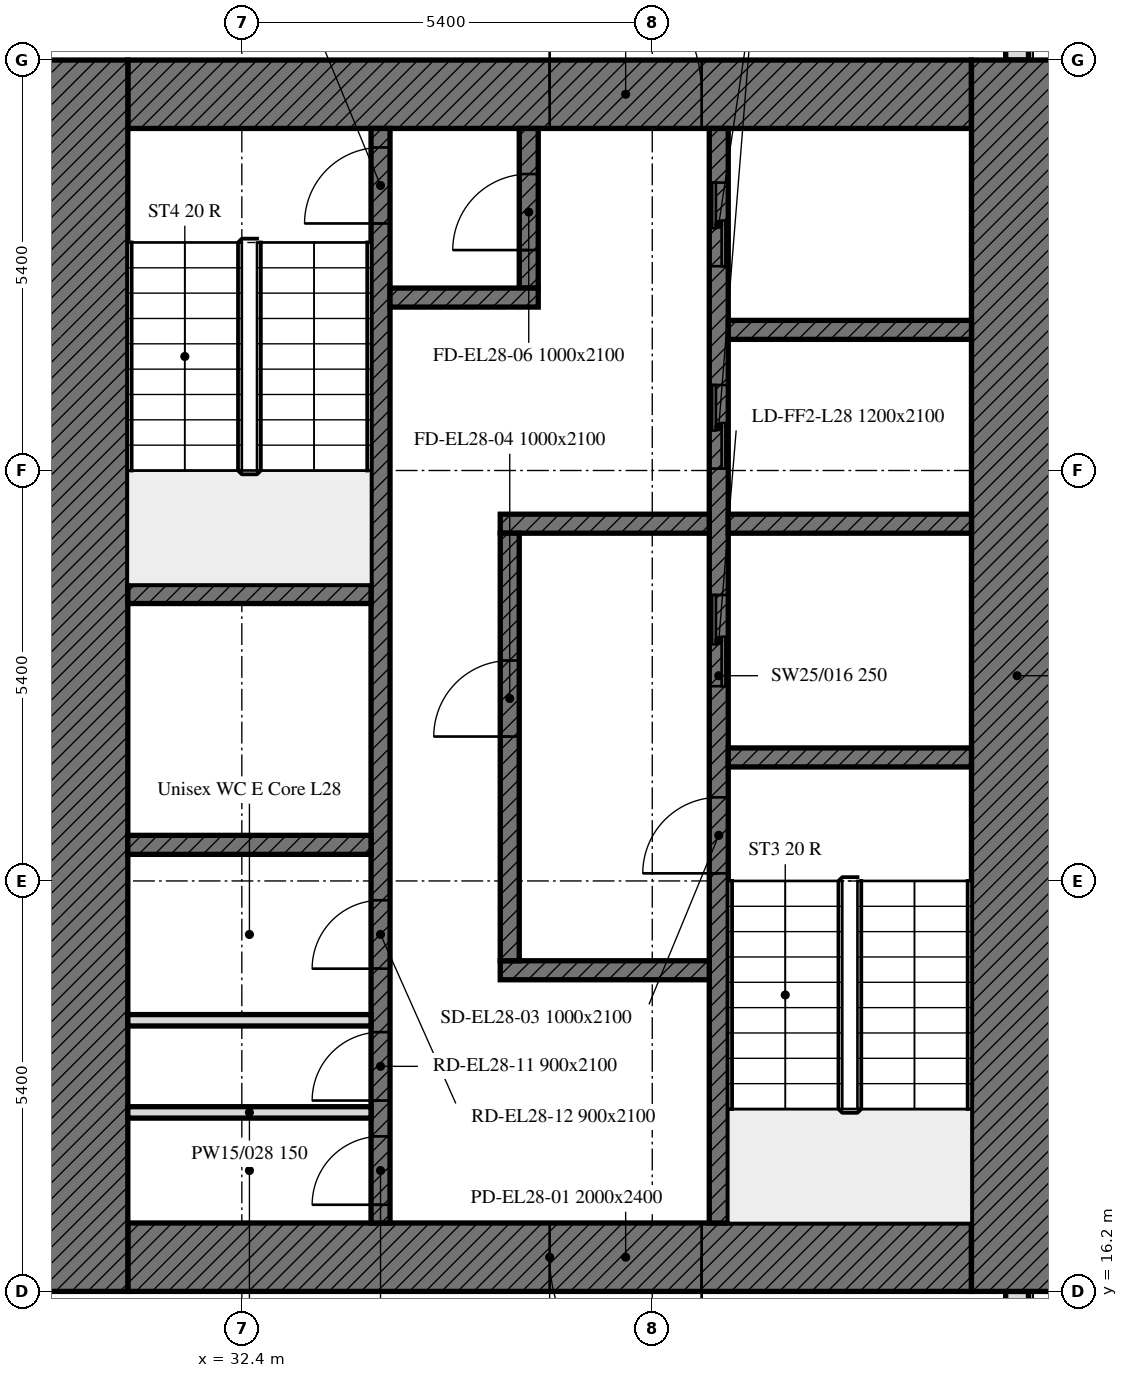
"""IFC4 building model, lengths in metres.
Left out: names, types, materials, properties, quantities, classifications, styles, units other than length and angle.
Written with IfcOpenShell. Run it as: python <this file> out.ifc"""

import sys

from ifc_helpers import new_model, si_unit, direction, frame, frame_2d, origin, place, context, subcontext, project, spatial, rectangle, extrude, element, fill, save


model = new_model("IFC4")
c1 = context("Model", 3, precision=1e-05, world=origin(), true_north=direction((0.0, 1.0)))
c2 = subcontext(c1, "Body", "Model", "MODEL_VIEW")
j1 = project(units=[si_unit("LENGTHUNIT", "METRE"), si_unit("PLANEANGLEUNIT", "RADIAN")], contexts=[c1])
p1 = place(None, origin())
s1 = spatial("IfcSite", under=j1, at=p1, CompositionType="ELEMENT")
p2 = place(p1, origin())
s2 = spatial("IfcBuilding", under=s1, at=p2, CompositionType="ELEMENT")
p3 = place(p2, frame((0.0, 0.0, 118.2)))
s3 = spatial("IfcBuildingStorey", under=s2, at=p3, CompositionType="ELEMENT", Elevation=118.2)
p4 = place(p3, frame((42.6, 10.986, 0.0), z_axis=(0.0, 0.0, 1.0), x_axis=(0.0, 1.0, 0.0)))
e1 = element("IfcWall", 1, at=p4, inside=s3, PredefinedType="SOLIDWALL", context=c2, shape_type="SweptSolid", body=[
    extrude(rectangle(XDim=5.214, YDim=0.3, at=frame_2d((2.607, 0.0))), origin(), (0.0, 0.0, 1.0), 3.5),
])
p5 = place(p4, frame((1.164, 0.0, 0.9)))
e2 = element("IfcOpeningElement", 2, at=p5, cuts=e1, PredefinedType="OPENING", context=c2, shape_type="SweptSolid", body=[
    extrude(rectangle(XDim=1.1, YDim=1.7, at=frame_2d((0.55, 0.85))), frame((0.0, 0.16, 0.0), z_axis=(0.0, -1.0, 0.0), x_axis=(1.0, 0.0, 0.0)), (0.0, 0.0, 1.0), 0.32),
])
p6 = place(p4, frame((2.764, 0.0, 0.9)))
e3 = element("IfcOpeningElement", 3, at=p6, cuts=e1, PredefinedType="OPENING", context=c2, shape_type="SweptSolid", body=[
    extrude(rectangle(XDim=1.1, YDim=1.7, at=frame_2d((0.55, 0.85))), frame((0.0, 0.16, 0.0), z_axis=(0.0, -1.0, 0.0), x_axis=(1.0, 0.0, 0.0)), (0.0, 0.0, 1.0), 0.32),
])
p7 = place(p3, frame((42.6, 32.4, 0.0), z_axis=(0.0, 0.0, 1.0), x_axis=(0.0, 1.0, 0.0)))
e4 = element("IfcWall", 4, at=p7, inside=s3, PredefinedType="SOLIDWALL", context=c2, shape_type="SweptSolid", body=[
    extrude(rectangle(XDim=10.614, YDim=0.3, at=frame_2d((5.307, 0.0))), origin(), (0.0, 0.0, 1.0), 3.5),
])
p8 = place(p7, frame((1.35, 0.0, 0.9)))
e5 = element("IfcOpeningElement", 5, at=p8, cuts=e4, PredefinedType="OPENING", context=c2, shape_type="SweptSolid", body=[
    extrude(rectangle(XDim=1.1, YDim=1.7, at=frame_2d((0.55, 0.85))), frame((0.0, 0.16, 0.0), z_axis=(0.0, -1.0, 0.0), x_axis=(1.0, 0.0, 0.0)), (0.0, 0.0, 1.0), 0.32),
])
p9 = place(p7, frame((2.95, 0.0, 0.9)))
e6 = element("IfcOpeningElement", 6, at=p9, cuts=e4, PredefinedType="OPENING", context=c2, shape_type="SweptSolid", body=[
    extrude(rectangle(XDim=1.1, YDim=1.7, at=frame_2d((0.55, 0.85))), frame((0.0, 0.16, 0.0), z_axis=(0.0, -1.0, 0.0), x_axis=(1.0, 0.0, 0.0)), (0.0, 0.0, 1.0), 0.32),
])
p10 = place(p3, frame((42.0, 16.65, 0.0), z_axis=(0.0, 0.0, 1.0), x_axis=(-1.0, 0.0, 0.0)))
e7 = element("IfcWall", 7, at=p10, inside=s3, PredefinedType="SOLIDWALL", context=c2, shape_type="SweptSolid", body=[
    extrude(rectangle(XDim=11.1, YDim=0.9, at=frame_2d((5.55, 0.0))), origin(), (0.0, 0.0, 1.0), 3.5),
])
p11 = place(p10, frame((3.55, 0.0, 0.0)))
e8 = element("IfcOpeningElement", 8, at=p11, cuts=e7, PredefinedType="OPENING", context=c2, shape_type="SweptSolid", body=[
    extrude(rectangle(XDim=2.0, YDim=2.4, at=frame_2d((1.0, 1.2))), frame((0.0, 0.45, 0.0), z_axis=(0.0, -1.0, 0.0), x_axis=(1.0, 0.0, 0.0)), (0.0, 0.0, 1.0), 0.9),
])
p12 = place(p3, frame((30.9, 31.95, 0.0), z_axis=(0.0, 0.0, 1.0), x_axis=(1.0, 0.0, 0.0)))
e9 = element("IfcWall", 9, at=p12, inside=s3, PredefinedType="SOLIDWALL", context=c2, shape_type="SweptSolid", body=[
    extrude(rectangle(XDim=11.1, YDim=0.9, at=frame_2d((5.55, 0.0))), origin(), (0.0, 0.0, 1.0), 3.5),
])
p13 = place(p12, frame((5.55, 0.0, 0.0)))
e10 = element("IfcOpeningElement", 10, at=p13, cuts=e9, PredefinedType="OPENING", context=c2, shape_type="SweptSolid", body=[
    extrude(rectangle(XDim=2.0, YDim=2.4, at=frame_2d((1.0, 1.2))), frame((0.0, 0.45, 0.0), z_axis=(0.0, -1.0, 0.0), x_axis=(1.0, 0.0, 0.0)), (0.0, 0.0, 1.0), 0.9),
])
for number, where, z_axis, x_axis in (
    (11, (42.6, 32.4, 0.0), (0.0, 0.0, 1.0), (0.0, -1.0, 0.0)),
    (12, (30.3, 16.2, 0.0), (0.0, 0.0, 1.0), (0.0, 1.0, 0.0)),
):
    element("IfcWall", number, at=place(p3, frame(where, z_axis=z_axis, x_axis=x_axis)), inside=s3, PredefinedType="SOLIDWALL", context=c2, shape_type="SweptSolid", body=[
        extrude(rectangle(XDim=16.2, YDim=1.2, at=frame_2d((8.1, 0.0))), origin(), (0.0, 0.0, 1.0), 3.5),
    ])
p14 = place(p3, frame((38.675, 17.1, 0.0), z_axis=(0.0, 0.0, 1.0), x_axis=(0.0, 1.0, 0.0)))
e13 = element("IfcWall", 13, at=p14, inside=s3, PredefinedType="SOLIDWALL", context=c2, shape_type="SweptSolid", body=[
    extrude(rectangle(XDim=14.4, YDim=0.25, at=frame_2d((7.2, 0.0))), origin(), (0.0, 0.0, 1.0), 3.5),
])
p15 = place(p14, frame((4.6, 0.0, 0.0)))
e14 = element("IfcOpeningElement", 14, at=p15, cuts=e13, PredefinedType="OPENING", context=c2, shape_type="SweptSolid", body=[
    extrude(rectangle(XDim=1.0, YDim=2.1, at=frame_2d((0.5, 1.05))), frame((0.0, 0.125, 0.0), z_axis=(0.0, -1.0, 0.0), x_axis=(1.0, 0.0, 0.0)), (0.0, 0.0, 1.0), 0.25),
])
p16 = place(p14, frame((7.062, 0.0, 0.0)))
e15 = element("IfcOpeningElement", 15, at=p16, cuts=e13, PredefinedType="OPENING", context=c2, shape_type="SweptSolid", body=[
    extrude(rectangle(XDim=1.2, YDim=2.1, at=frame_2d((0.6, 1.05))), frame((0.0, 0.125, 0.0), z_axis=(0.0, -1.0, 0.0), x_axis=(1.0, 0.0, 0.0)), (0.0, 0.0, 1.0), 0.25),
])
p17 = place(p14, frame((9.925, 0.0, 0.0)))
e16 = element("IfcOpeningElement", 16, at=p17, cuts=e13, PredefinedType="OPENING", context=c2, shape_type="SweptSolid", body=[
    extrude(rectangle(XDim=1.1, YDim=2.1, at=frame_2d((0.55, 1.05))), frame((0.0, 0.125, 0.0), z_axis=(0.0, -1.0, 0.0), x_axis=(1.0, 0.0, 0.0)), (0.0, 0.0, 1.0), 0.25),
])
p18 = place(p14, frame((12.587, 0.0, 0.0)))
e17 = element("IfcOpeningElement", 17, at=p18, cuts=e13, PredefinedType="OPENING", context=c2, shape_type="SweptSolid", body=[
    extrude(rectangle(XDim=1.1, YDim=2.1, at=frame_2d((0.55, 1.05))), frame((0.0, 0.125, 0.0), z_axis=(0.0, -1.0, 0.0), x_axis=(1.0, 0.0, 0.0)), (0.0, 0.0, 1.0), 0.25),
])
p19 = place(p3, frame((34.225, 17.1, 0.0), z_axis=(0.0, 0.0, 1.0), x_axis=(0.0, 1.0, 0.0)))
e18 = element("IfcWall", 18, at=p19, inside=s3, PredefinedType="SOLIDWALL", context=c2, shape_type="SweptSolid", body=[
    extrude(rectangle(XDim=14.4, YDim=0.25, at=frame_2d((7.2, 0.0))), origin(), (0.0, 0.0, 1.0), 3.5),
])
p20 = place(p19, frame((13.15, 0.0, 0.0)))
e19 = element("IfcOpeningElement", 19, at=p20, cuts=e18, PredefinedType="OPENING", context=c2, shape_type="SweptSolid", body=[
    extrude(rectangle(XDim=1.0, YDim=2.1, at=frame_2d((0.5, 1.05))), frame((0.0, 0.125, 0.0), z_axis=(0.0, -1.0, 0.0), x_axis=(1.0, 0.0, 0.0)), (0.0, 0.0, 1.0), 0.25),
])
p21 = place(p19, frame((0.24, 0.0, 0.0)))
e20 = element("IfcOpeningElement", 20, at=p21, cuts=e18, PredefinedType="OPENING", context=c2, shape_type="SweptSolid", body=[
    extrude(rectangle(XDim=0.9, YDim=2.1, at=frame_2d((0.45, 1.05))), frame((0.0, 0.125, 0.0), z_axis=(0.0, -1.0, 0.0), x_axis=(1.0, 0.0, 0.0)), (0.0, 0.0, 1.0), 0.25),
])
p22 = place(p19, frame((1.611, 0.0, 0.0)))
e21 = element("IfcOpeningElement", 21, at=p22, cuts=e18, PredefinedType="OPENING", context=c2, shape_type="SweptSolid", body=[
    extrude(rectangle(XDim=0.9, YDim=2.1, at=frame_2d((0.45, 1.05))), frame((0.0, 0.125, 0.0), z_axis=(0.0, -1.0, 0.0), x_axis=(1.0, 0.0, 0.0)), (0.0, 0.0, 1.0), 0.25),
])
p23 = place(p19, frame((3.346, 0.0, 0.0)))
e22 = element("IfcOpeningElement", 22, at=p23, cuts=e18, PredefinedType="OPENING", context=c2, shape_type="SweptSolid", body=[
    extrude(rectangle(XDim=0.9, YDim=2.1, at=frame_2d((0.45, 1.05))), frame((0.0, 0.125, 0.0), z_axis=(0.0, -1.0, 0.0), x_axis=(1.0, 0.0, 0.0)), (0.0, 0.0, 1.0), 0.25),
])
p24 = place(p3, frame((38.8, 23.225, 0.0), z_axis=(0.0, 0.0, 1.0), x_axis=(1.0, 0.0, 0.0)))
e23 = element("IfcWall", 23, at=p24, inside=s3, PredefinedType="SOLIDWALL", context=c2, shape_type="SweptSolid", body=[
    extrude(rectangle(XDim=3.2, YDim=0.25, at=frame_2d((1.6, 0.0))), origin(), (0.0, 0.0, 1.0), 3.5),
])
for number, where, z_axis, x_axis in (
    (24, (30.9, 25.375, 0.0), (0.0, 0.0, 1.0), (1.0, 0.0, 0.0)),
    (25, (30.9, 22.075, 0.0), (0.0, 0.0, 1.0), (1.0, 0.0, 0.0)),
):
    element("IfcWall", number, at=place(p3, frame(where, z_axis=z_axis, x_axis=x_axis)), inside=s3, PredefinedType="SOLIDWALL", context=c2, shape_type="SweptSolid", body=[
        extrude(rectangle(XDim=3.2, YDim=0.25, at=frame_2d((1.6, 0.0))), origin(), (0.0, 0.0, 1.0), 3.5),
    ])
p25 = place(p3, frame((38.8, 26.3, 0.0), z_axis=(0.0, 0.0, 1.0), x_axis=(1.0, 0.0, 0.0)))
e26 = element("IfcWall", 26, at=p25, inside=s3, PredefinedType="SOLIDWALL", context=c2, shape_type="SweptSolid", body=[
    extrude(rectangle(XDim=3.2, YDim=0.25, at=frame_2d((1.6, 0.0))), origin(), (0.0, 0.0, 1.0), 3.5),
])
for number, where, z_axis, x_axis in (
    (27, (35.8, 26.3, 0.0), (0.0, 0.0, 1.0), (1.0, 0.0, 0.0)),
    (28, (35.8, 20.425, 0.0), (0.0, 0.0, 1.0), (1.0, 0.0, 0.0)),
):
    element("IfcWall", number, at=place(p3, frame(where, z_axis=z_axis, x_axis=x_axis)), inside=s3, PredefinedType="SOLIDWALL", context=c2, shape_type="SweptSolid", body=[
        extrude(rectangle(XDim=2.75, YDim=0.25, at=frame_2d((1.375, 0.0))), origin(), (0.0, 0.0, 1.0), 3.5),
    ])
p26 = place(p3, frame((36.175, 29.4, 0.0), z_axis=(0.0, 0.0, 1.0), x_axis=(0.0, 1.0, 0.0)))
e29 = element("IfcWall", 29, at=p26, inside=s3, PredefinedType="SOLIDWALL", context=c2, shape_type="SweptSolid", body=[
    extrude(rectangle(XDim=2.1, YDim=0.25, at=frame_2d((1.05, 0.0))), origin(), (0.0, 0.0, 1.0), 3.5),
])
p27 = place(p26, frame((0.5, 0.0, 0.0)))
e30 = element("IfcOpeningElement", 30, at=p27, cuts=e29, PredefinedType="OPENING", context=c2, shape_type="SweptSolid", body=[
    extrude(rectangle(XDim=1.0, YDim=2.1, at=frame_2d((0.5, 1.05))), frame((0.0, 0.125, 0.0), z_axis=(0.0, -1.0, 0.0), x_axis=(1.0, 0.0, 0.0)), (0.0, 0.0, 1.0), 0.25),
])
p28 = place(p3, frame((34.35, 29.275, 0.0), z_axis=(0.0, 0.0, 1.0), x_axis=(1.0, 0.0, 0.0)))
e31 = element("IfcWall", 31, at=p28, inside=s3, PredefinedType="SOLIDWALL", context=c2, shape_type="SweptSolid", body=[
    extrude(rectangle(XDim=1.95, YDim=0.25, at=frame_2d((0.975, 0.0))), origin(), (0.0, 0.0, 1.0), 3.5),
])
p29 = place(p3, frame((35.925, 20.55, 0.0), z_axis=(0.0, 0.0, 1.0), x_axis=(0.0, 1.0, 0.0)))
e32 = element("IfcWall", 32, at=p29, inside=s3, PredefinedType="SOLIDWALL", context=c2, shape_type="SweptSolid", body=[
    extrude(rectangle(XDim=5.625, YDim=0.25, at=frame_2d((2.812, 0.0))), origin(), (0.0, 0.0, 1.0), 3.5),
])
p30 = place(p29, frame((2.95, 0.0, 0.0)))
e33 = element("IfcOpeningElement", 33, at=p30, cuts=e32, PredefinedType="OPENING", context=c2, shape_type="SweptSolid", body=[
    extrude(rectangle(XDim=1.0, YDim=2.1, at=frame_2d((0.5, 1.05))), frame((0.0, 0.125, 0.0), z_axis=(0.0, -1.0, 0.0), x_axis=(1.0, 0.0, 0.0)), (0.0, 0.0, 1.0), 0.25),
])
p31 = place(p3, frame((38.8, 28.85, 0.0), z_axis=(0.0, 0.0, 1.0), x_axis=(1.0, 0.0, 0.0)))
e34 = element("IfcWall", 34, at=p31, inside=s3, PredefinedType="SOLIDWALL", context=c2, shape_type="SweptSolid", body=[
    extrude(rectangle(XDim=3.2, YDim=0.25, at=frame_2d((1.6, 0.0))), origin(), (0.0, 0.0, 1.0), 3.5),
])
for number, where, z_axis, x_axis in (
    (35, (30.9, 18.555, 0.0), (0.0, 0.0, 1.0), (1.0, 0.0, 0.0)),
    (36, (30.9, 19.767, 0.0), (0.0, 0.0, 1.0), (1.0, 0.0, 0.0)),
):
    element("IfcWall", number, at=place(p3, frame(where, z_axis=z_axis, x_axis=x_axis)), inside=s3, PredefinedType="PARTITIONING", context=c2, shape_type="SweptSolid", body=[
        extrude(rectangle(XDim=3.2, YDim=0.15, at=frame_2d((1.6, 0.0))), origin(), (0.0, 0.0, 1.0), 3.5),
    ])
p32 = place(p11, origin())
e37 = element("IfcDoor", 37, at=p32, inside=s3, OperationType="DOUBLE_DOOR_SINGLE_SWING", PredefinedType="DOOR", context=c2, shape_type="SweptSolid", body=[
    extrude(rectangle(XDim=2.0, YDim=2.4, at=frame_2d((1.0, 1.2))), frame((0.0, 0.025, 0.0), z_axis=(0.0, -1.0, 0.0), x_axis=(1.0, 0.0, 0.0)), (0.0, 0.0, 1.0), 0.05),
])
fill(e8, e37)
p33 = place(p13, origin())
e38 = element("IfcDoor", 38, at=p33, inside=s3, OperationType="DOUBLE_DOOR_SINGLE_SWING", PredefinedType="DOOR", context=c2, shape_type="SweptSolid", body=[
    extrude(rectangle(XDim=2.0, YDim=2.4, at=frame_2d((1.0, 1.2))), frame((0.0, 0.025, 0.0), z_axis=(0.0, -1.0, 0.0), x_axis=(1.0, 0.0, 0.0)), (0.0, 0.0, 1.0), 0.05),
])
fill(e10, e38)
p34 = place(p15, origin())
e39 = element("IfcDoor", 39, at=p34, inside=s3, OperationType="SINGLE_SWING_LEFT", PredefinedType="DOOR", context=c2, shape_type="SweptSolid", body=[
    extrude(rectangle(XDim=1.0, YDim=2.1, at=frame_2d((0.5, 1.05))), frame((0.0, 0.025, 0.0), z_axis=(0.0, -1.0, 0.0), x_axis=(1.0, 0.0, 0.0)), (0.0, 0.0, 1.0), 0.05),
])
fill(e14, e39)
p35 = place(p30, origin())
e40 = element("IfcDoor", 40, at=p35, inside=s3, OperationType="SINGLE_SWING_LEFT", PredefinedType="DOOR", context=c2, shape_type="SweptSolid", body=[
    extrude(rectangle(XDim=1.0, YDim=2.1, at=frame_2d((0.5, 1.05))), frame((0.0, 0.025, 0.0), z_axis=(0.0, -1.0, 0.0), x_axis=(1.0, 0.0, 0.0)), (0.0, 0.0, 1.0), 0.05),
])
fill(e33, e40)
p36 = place(p20, origin())
e41 = element("IfcDoor", 41, at=p36, inside=s3, OperationType="SINGLE_SWING_LEFT", PredefinedType="DOOR", context=c2, shape_type="SweptSolid", body=[
    extrude(rectangle(XDim=1.0, YDim=2.1, at=frame_2d((0.5, 1.05))), frame((0.0, 0.025, 0.0), z_axis=(0.0, -1.0, 0.0), x_axis=(1.0, 0.0, 0.0)), (0.0, 0.0, 1.0), 0.05),
])
fill(e19, e41)
p37 = place(p27, origin())
e42 = element("IfcDoor", 42, at=p37, inside=s3, OperationType="SINGLE_SWING_LEFT", PredefinedType="DOOR", context=c2, shape_type="SweptSolid", body=[
    extrude(rectangle(XDim=1.0, YDim=2.1, at=frame_2d((0.5, 1.05))), frame((0.0, 0.025, 0.0), z_axis=(0.0, -1.0, 0.0), x_axis=(1.0, 0.0, 0.0)), (0.0, 0.0, 1.0), 0.05),
])
fill(e30, e42)
p38 = place(p16, origin())
e43 = element("IfcDoor", 43, at=p38, inside=s3, OperationType="DOUBLE_DOOR_SLIDING", PredefinedType="DOOR", context=c2, shape_type="SweptSolid", body=[
    extrude(rectangle(XDim=1.2, YDim=2.1, at=frame_2d((0.6, 1.05))), frame((0.0, 0.025, 0.0), z_axis=(0.0, -1.0, 0.0), x_axis=(1.0, 0.0, 0.0)), (0.0, 0.0, 1.0), 0.05),
])
fill(e15, e43)
p39 = place(p17, origin())
e44 = element("IfcDoor", 44, at=p39, inside=s3, OperationType="DOUBLE_DOOR_SLIDING", PredefinedType="DOOR", context=c2, shape_type="SweptSolid", body=[
    extrude(rectangle(XDim=1.1, YDim=2.1, at=frame_2d((0.55, 1.05))), frame((0.0, 0.025, 0.0), z_axis=(0.0, -1.0, 0.0), x_axis=(1.0, 0.0, 0.0)), (0.0, 0.0, 1.0), 0.05),
])
fill(e16, e44)
p40 = place(p18, origin())
e45 = element("IfcDoor", 45, at=p40, inside=s3, OperationType="DOUBLE_DOOR_SLIDING", PredefinedType="DOOR", context=c2, shape_type="SweptSolid", body=[
    extrude(rectangle(XDim=1.1, YDim=2.1, at=frame_2d((0.55, 1.05))), frame((0.0, 0.025, 0.0), z_axis=(0.0, -1.0, 0.0), x_axis=(1.0, 0.0, 0.0)), (0.0, 0.0, 1.0), 0.05),
])
fill(e17, e45)
p41 = place(p21, origin())
e46 = element("IfcDoor", 46, at=p41, inside=s3, OperationType="SINGLE_SWING_LEFT", PredefinedType="DOOR", context=c2, shape_type="SweptSolid", body=[
    extrude(rectangle(XDim=0.9, YDim=2.1, at=frame_2d((0.45, 1.05))), frame((0.0, 0.025, 0.0), z_axis=(0.0, -1.0, 0.0), x_axis=(1.0, 0.0, 0.0)), (0.0, 0.0, 1.0), 0.05),
])
fill(e20, e46)
p42 = place(p22, origin())
e47 = element("IfcDoor", 47, at=p42, inside=s3, OperationType="SINGLE_SWING_LEFT", PredefinedType="DOOR", context=c2, shape_type="SweptSolid", body=[
    extrude(rectangle(XDim=0.9, YDim=2.1, at=frame_2d((0.45, 1.05))), frame((0.0, 0.025, 0.0), z_axis=(0.0, -1.0, 0.0), x_axis=(1.0, 0.0, 0.0)), (0.0, 0.0, 1.0), 0.05),
])
fill(e21, e47)
p43 = place(p23, origin())
e48 = element("IfcDoor", 48, at=p43, inside=s3, OperationType="SINGLE_SWING_LEFT", PredefinedType="DOOR", context=c2, shape_type="SweptSolid", body=[
    extrude(rectangle(XDim=0.9, YDim=2.1, at=frame_2d((0.45, 1.05))), frame((0.0, 0.025, 0.0), z_axis=(0.0, -1.0, 0.0), x_axis=(1.0, 0.0, 0.0)), (0.0, 0.0, 1.0), 0.05),
])
fill(e22, e48)
save(model, sys.argv[1])
